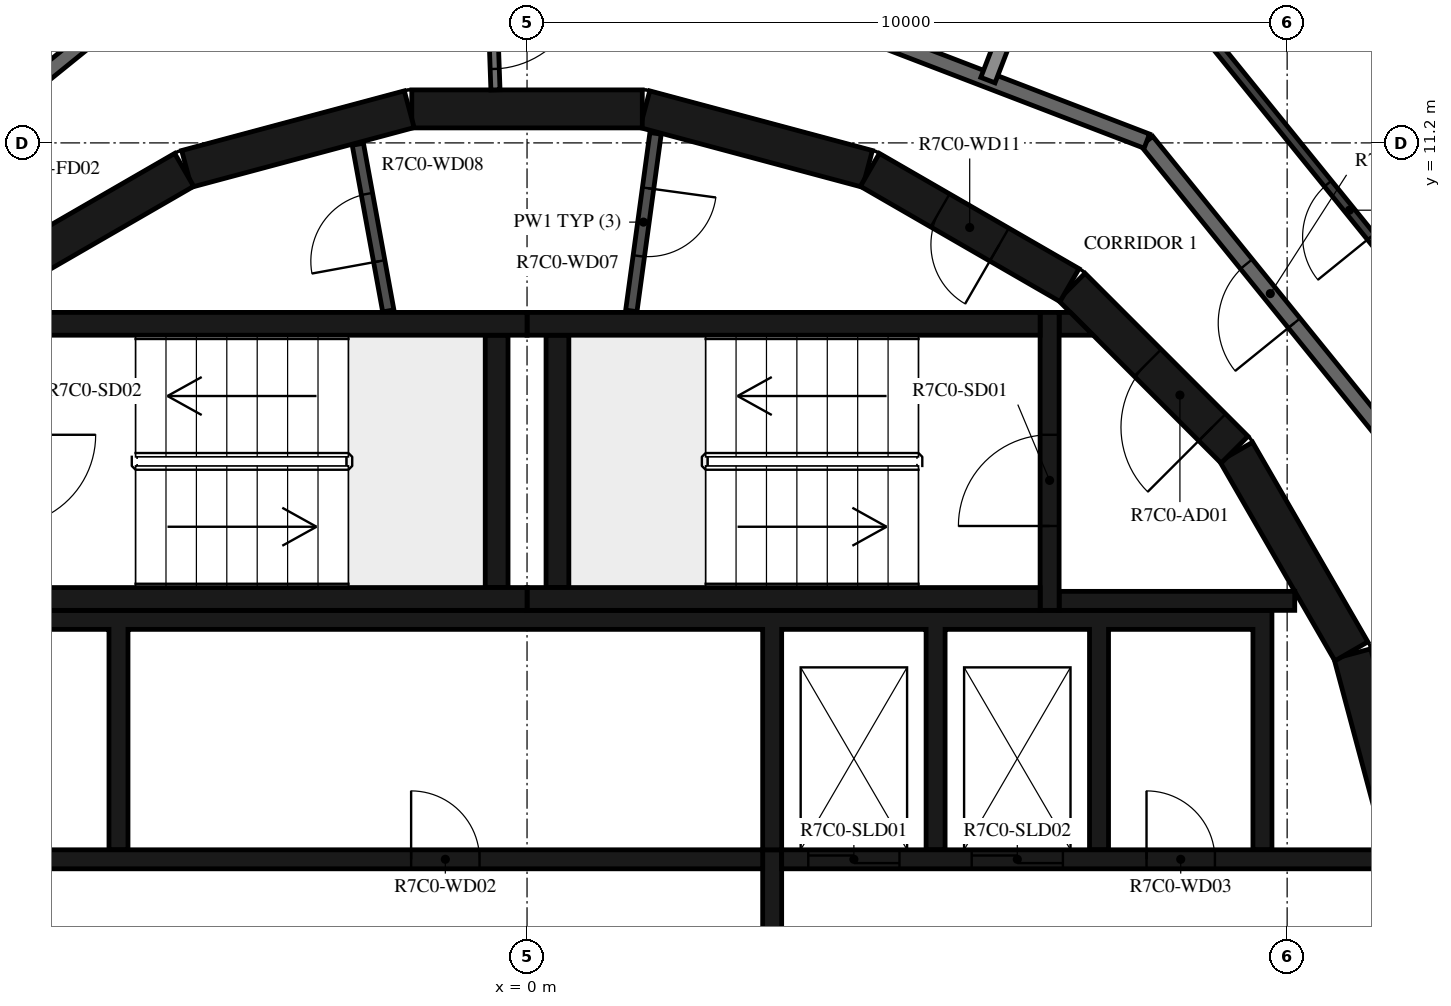
"""IFC4 building model, lengths in metres.
Left out: names, types, materials, properties, quantities, classifications, styles, units other than length and angle.
Written with IfcOpenShell. Run it as: python <this file> out.ifc"""

import sys

from ifc_helpers import new_model, si_unit, direction, frame, frame_2d, origin, place, context, subcontext, project, spatial, polyline, rectangle, outline, extrude, element, fill, save


model = new_model("IFC4")
c1 = context("Model", 3, precision=1e-05, world=origin(), true_north=direction((0.0, 1.0)))
c2 = subcontext(c1, "Body", "Model", "MODEL_VIEW")
j1 = project(units=[si_unit("LENGTHUNIT", "METRE"), si_unit("PLANEANGLEUNIT", "RADIAN")], contexts=[c1])
p1 = place(None, origin())
s1 = spatial("IfcSite", under=j1, at=p1, CompositionType="ELEMENT")
p2 = place(p1, origin())
s2 = spatial("IfcBuilding", under=s1, at=p2, CompositionType="ELEMENT")
p3 = place(p2, frame((0.0, 0.0, 284.4)))
s3 = spatial("IfcBuildingStorey", under=s2, at=p3, CompositionType="ELEMENT", Elevation=284.4)
for number, where, z_axis, x_axis in (
    (1, (11.643, 1.55, 0.0), (0.0, 0.0, 1.0), (-0.259, 0.966, 0.0)),
    (2, (10.845, 4.51, 0.0), (0.0, 0.0, 1.0), (-0.5, 0.866, 0.0)),
):
    element("IfcWall", number, at=place(p3, frame(where, z_axis=z_axis, x_axis=x_axis)), inside=s3, PredefinedType="SHEAR", context=c2, shape_type="SweptSolid", body=[
        extrude(rectangle(XDim=3.033, YDim=0.5, at=frame_2d((1.516, 0.0))), origin(), (0.0, 0.0, 1.0), 3.12),
    ])
p4 = place(p3, frame((9.308, 7.164, 0.0), z_axis=(0.0, 0.0, 1.0), x_axis=(-0.707106781187, 0.707106781187, 0.0)))
e3 = element("IfcWall", 3, at=p4, inside=s3, PredefinedType="SHEAR", context=c2, shape_type="SweptSolid", body=[
    extrude(rectangle(XDim=3.032, YDim=0.5, at=frame_2d((1.516, 0.0))), origin(), (0.0, 0.0, 1.0), 3.12),
])
p5 = place(p4, frame((0.416, 0.0, 0.0)))
e4 = element("IfcOpeningElement", 4, at=p5, cuts=e3, PredefinedType="OPENING", context=c2, shape_type="SweptSolid", body=[
    extrude(rectangle(XDim=1.2, YDim=2.1, at=frame_2d((0.6, 1.05))), frame((0.0, 0.26, 0.0), z_axis=(0.0, -1.0, 0.0), x_axis=(1.0, 0.0, 0.0)), (0.0, 0.0, 1.0), 0.52),
])
p6 = place(p3, frame((7.137, 9.329, 0.0), z_axis=(0.0, 0.0, 1.0), x_axis=(-0.865975092491, 0.500087131594, 0.0)))
e5 = element("IfcWall", 5, at=p6, inside=s3, PredefinedType="SHEAR", context=c2, shape_type="SweptSolid", body=[
    extrude(rectangle(XDim=3.033, YDim=0.5, at=frame_2d((1.516, 0.0))), origin(), (0.0, 0.0, 1.0), 3.12),
])
p7 = place(p6, frame((1.066, 0.0, 0.0)))
e6 = element("IfcOpeningElement", 6, at=p7, cuts=e5, PredefinedType="OPENING", context=c2, shape_type="SweptSolid", body=[
    extrude(rectangle(XDim=0.9, YDim=2.1, at=frame_2d((0.45, 1.05))), frame((0.0, 0.26, 0.0), z_axis=(0.0, -1.0, 0.0), x_axis=(1.0, 0.0, 0.0)), (0.0, 0.0, 1.0), 0.52),
])
for number, where, z_axis, x_axis in (
    (7, (4.479, 10.858, 0.0), (0.0, 0.0, 1.0), (-0.966, 0.259, 0.0)),
    (8, (1.516, 11.647, 0.0), (0.0, 0.0, 1.0), (-1.0, 0.0, 0.0)),
    (9, (-1.55, 11.643, 0.0), (0.0, 0.0, 1.0), (-0.966, -0.259, 0.0)),
    (10, (-4.51, 10.845, 0.0), (0.0, 0.0, 1.0), (-0.866, -0.5, 0.0)),
):
    element("IfcWall", number, at=place(p3, frame(where, z_axis=z_axis, x_axis=x_axis)), inside=s3, PredefinedType="SHEAR", context=c2, shape_type="SweptSolid", body=[
        extrude(rectangle(XDim=3.033, YDim=0.5, at=frame_2d((1.516, 0.0))), origin(), (0.0, 0.0, 1.0), 3.12),
    ])
for number, where, z_axis, x_axis in (
    (11, (0.0, 5.2, 0.0), (0.0, 0.0, 1.0), (1.0, 0.0, 0.0)),
    (12, (0.0, 8.82, 0.0), (0.0, 0.0, 1.0), (1.0, 0.0, 0.0)),
):
    element("IfcWall", number, at=place(p3, frame(where, z_axis=z_axis, x_axis=x_axis)), inside=s3, PredefinedType="SHEAR", context=c2, shape_type="SweptSolid", body=[
        extrude(rectangle(XDim=6.75, YDim=0.3, at=frame_2d((3.375, 0.0))), origin(), (0.0, 0.0, 1.0), 3.12),
    ])
p8 = place(p3, frame((0.4, 5.35, 0.0), z_axis=(0.0, 0.0, 1.0), x_axis=(0.0, 1.0, 0.0)))
e13 = element("IfcWall", 13, at=p8, inside=s3, PredefinedType="SHEAR", context=c2, shape_type="SweptSolid", body=[
    extrude(rectangle(XDim=3.32, YDim=0.3, at=frame_2d((1.66, 0.0))), origin(), (0.0, 0.0, 1.0), 3.12),
])
p9 = place(p3, frame((6.875, 5.05, 0.0), z_axis=(0.0, 0.0, 1.0), x_axis=(0.0, 1.0, 0.0)))
e14 = element("IfcWall", 14, at=p9, inside=s3, PredefinedType="SHEAR", context=c2, shape_type="SweptSolid", body=[
    extrude(rectangle(XDim=3.92, YDim=0.25, at=frame_2d((1.96, 0.0))), origin(), (0.0, 0.0, 1.0), 3.12),
])
p10 = place(p9, frame((1.11, 0.0, 0.0)))
e15 = element("IfcOpeningElement", 15, at=p10, cuts=e14, PredefinedType="OPENING", context=c2, shape_type="SweptSolid", body=[
    extrude(rectangle(XDim=1.2, YDim=2.1, at=frame_2d((0.6, 1.05))), frame((0.0, 0.135, 0.0), z_axis=(0.0, -1.0, 0.0), x_axis=(1.0, 0.0, 0.0)), (0.0, 0.0, 1.0), 0.27),
])
p11 = place(p3, frame((7.0, 5.175, 0.0), z_axis=(0.0, 0.0, 1.0), x_axis=(1.0, 0.0, 0.0)))
e16 = element("IfcWall", 16, at=p11, inside=s3, PredefinedType="SHEAR", context=c2, shape_type="SweptSolid", body=[
    extrude(rectangle(XDim=3.1, YDim=0.25, at=frame_2d((1.55, 0.0))), origin(), (0.0, 0.0, 1.0), 3.12),
])
p12 = place(p3, origin())
e17 = element("IfcWall", 17, at=p12, inside=s3, PredefinedType="SHEAR", context=c2, shape_type="SweptSolid", body=[
    extrude(outline(polyline([(7.448, 8.67), (7.0, 8.67), (7.0, 8.97), (7.148, 8.97), (7.448, 8.67)])), origin(), (0.0, 0.0, 1.0), 3.12),
])
for number, where, z_axis, x_axis in (
    (18, (-6.75, 5.2, 0.0), (0.0, 0.0, 1.0), (1.0, 0.0, 0.0)),
    (19, (-6.75, 8.82, 0.0), (0.0, 0.0, 1.0), (1.0, 0.0, 0.0)),
):
    element("IfcWall", number, at=place(p3, frame(where, z_axis=z_axis, x_axis=x_axis)), inside=s3, PredefinedType="SHEAR", context=c2, shape_type="SweptSolid", body=[
        extrude(rectangle(XDim=6.75, YDim=0.3, at=frame_2d((3.375, 0.0))), origin(), (0.0, 0.0, 1.0), 3.12),
    ])
p13 = place(p3, frame((-0.4, 5.35, 0.0), z_axis=(0.0, 0.0, 1.0), x_axis=(0.0, 1.0, 0.0)))
e20 = element("IfcWall", 20, at=p13, inside=s3, PredefinedType="SHEAR", context=c2, shape_type="SweptSolid", body=[
    extrude(rectangle(XDim=3.32, YDim=0.3, at=frame_2d((1.66, 0.0))), origin(), (0.0, 0.0, 1.0), 3.12),
])
p14 = place(p3, origin())
e21 = element("IfcWall", 21, at=p14, inside=s3, PredefinedType="SHEAR", context=c2, shape_type="SweptSolid", body=[
    extrude(outline(polyline([(-9.8, 1.9), (-9.55, 1.9), (-9.55, 4.8), (-5.5, 4.8), (-5.5, 1.9), (-5.25, 1.9), (-5.25, 4.8), (3.1, 4.8), (3.1, 1.9), (3.35, 1.9), (3.35, 4.8), (5.25, 4.8), (5.25, 1.9), (5.5, 1.9), (5.5, 4.8), (7.4, 4.8), (7.4, 1.9), (7.65, 1.9), (7.65, 4.8), (9.55, 4.8), (9.55, 1.9), (9.8, 1.9), (9.8, 4.8), (9.8, 5.05), (-9.8, 5.05), (-9.8, 4.8), (-9.8, 1.9)])), origin(), (0.0, 0.0, 1.0), 3.12),
])
p15 = place(p3, frame((-11.28, 1.775, 0.0), z_axis=(0.0, 0.0, 1.0), x_axis=(1.0, 0.0, 0.0)))
e22 = element("IfcWall", 22, at=p15, inside=s3, PredefinedType="SHEAR", context=c2, shape_type="SweptSolid", body=[
    extrude(rectangle(XDim=14.38, YDim=0.25, at=frame_2d((7.19, 0.0))), origin(), (0.0, 0.0, 1.0), 3.12),
])
p16 = place(p15, frame((3.305, 0.0, 0.0)))
e23 = element("IfcOpeningElement", 23, at=p16, cuts=e22, PredefinedType="OPENING", context=c2, shape_type="SweptSolid", body=[
    extrude(rectangle(XDim=0.9, YDim=2.1, at=frame_2d((0.45, 1.05))), frame((0.0, 0.135, 0.0), z_axis=(0.0, -1.0, 0.0), x_axis=(1.0, 0.0, 0.0)), (0.0, 0.0, 1.0), 0.27),
])
p17 = place(p15, frame((9.755, 0.0, 0.0)))
e24 = element("IfcOpeningElement", 24, at=p17, cuts=e22, PredefinedType="OPENING", context=c2, shape_type="SweptSolid", body=[
    extrude(rectangle(XDim=0.9, YDim=2.1, at=frame_2d((0.45, 1.05))), frame((0.0, 0.135, 0.0), z_axis=(0.0, -1.0, 0.0), x_axis=(1.0, 0.0, 0.0)), (0.0, 0.0, 1.0), 0.27),
])
p18 = place(p3, frame((3.35, 1.775, 0.0), z_axis=(0.0, 0.0, 1.0), x_axis=(1.0, 0.0, 0.0)))
e25 = element("IfcWall", 25, at=p18, inside=s3, PredefinedType="SHEAR", context=c2, shape_type="SweptSolid", body=[
    extrude(rectangle(XDim=7.93, YDim=0.25, at=frame_2d((3.965, 0.0))), origin(), (0.0, 0.0, 1.0), 3.12),
])
p19 = place(p18, frame((0.35, 0.0, 0.0)))
e26 = element("IfcOpeningElement", 26, at=p19, cuts=e25, PredefinedType="OPENING", context=c2, shape_type="SweptSolid", body=[
    extrude(rectangle(XDim=1.2, YDim=2.4, at=frame_2d((0.6, 1.2))), frame((0.0, 0.135, 0.0), z_axis=(0.0, -1.0, 0.0), x_axis=(1.0, 0.0, 0.0)), (0.0, 0.0, 1.0), 0.27),
])
p20 = place(p18, frame((2.5, 0.0, 0.0)))
e27 = element("IfcOpeningElement", 27, at=p20, cuts=e25, PredefinedType="OPENING", context=c2, shape_type="SweptSolid", body=[
    extrude(rectangle(XDim=1.2, YDim=2.4, at=frame_2d((0.6, 1.2))), frame((0.0, 0.135, 0.0), z_axis=(0.0, -1.0, 0.0), x_axis=(1.0, 0.0, 0.0)), (0.0, 0.0, 1.0), 0.27),
])
p21 = place(p18, frame((4.8, 0.0, 0.0)))
e28 = element("IfcOpeningElement", 28, at=p21, cuts=e25, PredefinedType="OPENING", context=c2, shape_type="SweptSolid", body=[
    extrude(rectangle(XDim=0.9, YDim=2.1, at=frame_2d((0.45, 1.05))), frame((0.0, 0.135, 0.0), z_axis=(0.0, -1.0, 0.0), x_axis=(1.0, 0.0, 0.0)), (0.0, 0.0, 1.0), 0.27),
])
p22 = place(p3, frame((3.225, -1.9, 0.0), z_axis=(0.0, 0.0, 1.0), x_axis=(0.0, 1.0, 0.0)))
e29 = element("IfcWall", 29, at=p22, inside=s3, PredefinedType="SHEAR", context=c2, shape_type="SweptSolid", body=[
    extrude(rectangle(XDim=3.8, YDim=0.25, at=frame_2d((1.9, 0.0))), origin(), (0.0, 0.0, 1.0), 3.12),
])
p23 = place(p3, frame((1.691, 11.326, 0.0), z_axis=(0.0, 0.0, 1.0), x_axis=(-0.135344253201, -0.990798633994, 0.0)))
e30 = element("IfcWall", 30, at=p23, inside=s3, PredefinedType="PARTITIONING", context=c2, shape_type="SweptSolid", body=[
    extrude(rectangle(XDim=2.358, YDim=0.15, at=frame_2d((1.179, 0.0))), origin(), (0.0, 0.0, 1.0), 3.12),
])
p24 = place(p23, frame((0.729, 0.0, 0.0)))
e31 = element("IfcOpeningElement", 31, at=p24, cuts=e30, PredefinedType="OPENING", context=c2, shape_type="SweptSolid", body=[
    extrude(rectangle(XDim=0.9, YDim=2.1, at=frame_2d((0.45, 1.05))), frame((0.0, 0.085, 0.0), z_axis=(0.0, -1.0, 0.0), x_axis=(1.0, 0.0, 0.0)), (0.0, 0.0, 1.0), 0.17),
])
p25 = place(p3, frame((-1.825, 8.99, 0.0), z_axis=(0.0, 0.0, 1.0), x_axis=(-0.179955206115, 0.983674805915, 0.0)))
e32 = element("IfcWall", 32, at=p25, inside=s3, PredefinedType="PARTITIONING", context=c2, shape_type="SweptSolid", body=[
    extrude(rectangle(XDim=2.229, YDim=0.15, at=frame_2d((1.115, 0.0))), origin(), (0.0, 0.0, 1.0), 3.12),
])
p26 = place(p25, frame((0.665, 0.0, 0.0)))
e33 = element("IfcOpeningElement", 33, at=p26, cuts=e32, PredefinedType="OPENING", context=c2, shape_type="SweptSolid", body=[
    extrude(rectangle(XDim=0.9, YDim=2.1, at=frame_2d((0.45, 1.05))), frame((0.0, 0.085, 0.0), z_axis=(0.0, -1.0, 0.0), x_axis=(1.0, 0.0, 0.0)), (0.0, 0.0, 1.0), 0.17),
])
p27 = place(p3, frame((-0.471, 13.492, 0.0), z_axis=(0.0, 0.0, 1.0), x_axis=(0.034873173869, -0.999391745886, 0.0)))
e34 = element("IfcWall", 34, at=p27, inside=s3, PredefinedType="PARTITIONING", context=c2, shape_type="SweptSolid", body=[
    extrude(rectangle(XDim=1.596, YDim=0.12, at=frame_2d((0.798, 0.0))), origin(), (0.0, 0.0, 1.0), 3.12),
])
p28 = place(p27, frame((0.12, 0.0, 0.0)))
e35 = element("IfcOpeningElement", 35, at=p28, cuts=e34, PredefinedType="OPENING", context=c2, shape_type="SweptSolid", body=[
    extrude(rectangle(XDim=1.2, YDim=2.1, at=frame_2d((0.6, 1.05))), frame((0.0, 0.07, 0.0), z_axis=(0.0, -1.0, 0.0), x_axis=(1.0, 0.0, 0.0)), (0.0, 0.0, 1.0), 0.14),
])
p29 = place(p3, frame((12.673, 5.643, 0.0), z_axis=(0.0, 0.0, 1.0), x_axis=(-0.629302871585, 0.777160148113, 0.0)))
e36 = element("IfcWall", 36, at=p29, inside=s3, PredefinedType="STANDARD", context=c2, shape_type="SweptSolid", body=[
    extrude(rectangle(XDim=7.181, YDim=0.2, at=frame_2d((3.59, 0.0))), origin(), (0.0, 0.0, 1.0), 3.12),
])
p30 = place(p29, frame((4.1, 0.0, 0.0)))
e37 = element("IfcOpeningElement", 37, at=p30, cuts=e36, PredefinedType="OPENING", context=c2, shape_type="SweptSolid", body=[
    extrude(rectangle(XDim=1.0, YDim=2.1, at=frame_2d((0.5, 1.05))), frame((0.0, 0.11, 0.0), z_axis=(0.0, -1.0, 0.0), x_axis=(1.0, 0.0, 0.0)), (0.0, 0.0, 1.0), 0.22),
])
p31 = place(p3, frame((8.154, 11.223, 0.0), z_axis=(0.0, 0.0, 1.0), x_axis=(-0.93359073609, 0.358341090983, 0.0)))
e38 = element("IfcWall", 38, at=p31, inside=s3, PredefinedType="STANDARD", context=c2, shape_type="SweptSolid", body=[
    extrude(rectangle(XDim=7.181, YDim=0.2, at=frame_2d((3.59, 0.0))), origin(), (0.0, 0.0, 1.0), 3.12),
])
p32 = place(p3, frame((-5.643, 12.673, 0.0), z_axis=(0.0, 0.0, 1.0), x_axis=(-0.777160148113, -0.629302871585, 0.0)))
e39 = element("IfcWall", 39, at=p32, inside=s3, PredefinedType="STANDARD", context=c2, shape_type="SweptSolid", body=[
    extrude(rectangle(XDim=7.181, YDim=0.2, at=frame_2d((3.59, 0.0))), origin(), (0.0, 0.0, 1.0), 3.12),
])
p33 = place(p32, frame((2.39, 0.0, 0.0)))
e40 = element("IfcOpeningElement", 40, at=p33, cuts=e39, PredefinedType="OPENING", context=c2, shape_type="SweptSolid", body=[
    extrude(rectangle(XDim=1.0, YDim=2.1, at=frame_2d((0.5, 1.05))), frame((0.0, 0.11, 0.0), z_axis=(0.0, -1.0, 0.0), x_axis=(1.0, 0.0, 0.0)), (0.0, 0.0, 1.0), 0.22),
])
p34 = place(p32, frame((5.19, 0.0, 0.0)))
e41 = element("IfcOpeningElement", 41, at=p34, cuts=e39, PredefinedType="OPENING", context=c2, shape_type="SweptSolid", body=[
    extrude(rectangle(XDim=1.0, YDim=2.1, at=frame_2d((0.5, 1.05))), frame((0.0, 0.11, 0.0), z_axis=(0.0, -1.0, 0.0), x_axis=(1.0, 0.0, 0.0)), (0.0, 0.0, 1.0), 0.22),
])
p35 = place(p3, frame((7.532, 15.85, 0.0), z_axis=(0.0, 0.0, 1.0), x_axis=(-0.358355996975, -0.933585014571, 0.0)))
e42 = element("IfcWall", 42, at=p35, inside=s3, PredefinedType="STANDARD", context=c2, shape_type="SweptSolid", body=[
    extrude(rectangle(XDim=4.096, YDim=0.2, at=frame_2d((2.048, 0.0))), origin(), (0.0, 0.0, 1.0), 2.73),
])
p36 = place(p3, frame((14.092, 6.274, 0.0), z_axis=(0.0, 0.0, 1.0), x_axis=(-0.62933367237, 0.777135206268, 0.0)))
e43 = element("IfcWall", 43, at=p36, inside=s3, PredefinedType="PARTITIONING", context=c2, shape_type="SweptSolid", body=[
    extrude(rectangle(XDim=7.985, YDim=0.12, at=frame_2d((3.992, 0.0))), origin(), (0.0, 0.0, 1.0), 3.12),
])
p37 = place(p36, frame((2.978, 0.0, 0.0)))
e44 = element("IfcOpeningElement", 44, at=p37, cuts=e43, PredefinedType="OPENING", context=c2, shape_type="SweptSolid", body=[
    extrude(rectangle(XDim=0.9, YDim=2.1, at=frame_2d((0.45, 1.05))), frame((0.0, 0.07, 0.0), z_axis=(0.0, -1.0, 0.0), x_axis=(1.0, 0.0, 0.0)), (0.0, 0.0, 1.0), 0.14),
])
p38 = place(p36, frame((4.749, 0.0, 0.0)))
e45 = element("IfcOpeningElement", 45, at=p38, cuts=e43, PredefinedType="OPENING", context=c2, shape_type="SweptSolid", body=[
    extrude(rectangle(XDim=0.9, YDim=2.1, at=frame_2d((0.45, 1.05))), frame((0.0, 0.07, 0.0), z_axis=(0.0, -1.0, 0.0), x_axis=(1.0, 0.0, 0.0)), (0.0, 0.0, 1.0), 0.14),
])
p39 = place(p10, origin())
e46 = element("IfcDoor", 46, at=p39, inside=s3, OperationType="SINGLE_SWING_LEFT", PredefinedType="DOOR", context=c2, shape_type="SweptSolid", body=[
    extrude(rectangle(XDim=1.2, YDim=2.1, at=frame_2d((0.6, 1.05))), frame((0.0, 0.025, 0.0), z_axis=(0.0, -1.0, 0.0), x_axis=(1.0, 0.0, 0.0)), (0.0, 0.0, 1.0), 0.05),
])
fill(e15, e46)
p40 = place(p5, origin())
e47 = element("IfcDoor", 47, at=p40, inside=s3, OperationType="SINGLE_SWING_RIGHT", PredefinedType="DOOR", context=c2, shape_type="SweptSolid", body=[
    extrude(rectangle(XDim=1.2, YDim=2.1, at=frame_2d((0.6, 1.05))), frame((0.0, 0.025, 0.0), z_axis=(0.0, -1.0, 0.0), x_axis=(1.0, 0.0, 0.0)), (0.0, 0.0, 1.0), 0.05),
])
fill(e4, e47)
p41 = place(p19, origin())
e48 = element("IfcDoor", 48, at=p41, inside=s3, OperationType="DOUBLE_DOOR_SLIDING", PredefinedType="DOOR", context=c2, shape_type="SweptSolid", body=[
    extrude(rectangle(XDim=1.2, YDim=2.4, at=frame_2d((0.6, 1.2))), frame((0.0, 0.025, 0.0), z_axis=(0.0, -1.0, 0.0), x_axis=(1.0, 0.0, 0.0)), (0.0, 0.0, 1.0), 0.05),
])
fill(e26, e48)
p42 = place(p20, origin())
e49 = element("IfcDoor", 49, at=p42, inside=s3, OperationType="DOUBLE_DOOR_SLIDING", PredefinedType="DOOR", context=c2, shape_type="SweptSolid", body=[
    extrude(rectangle(XDim=1.2, YDim=2.4, at=frame_2d((0.6, 1.2))), frame((0.0, 0.025, 0.0), z_axis=(0.0, -1.0, 0.0), x_axis=(1.0, 0.0, 0.0)), (0.0, 0.0, 1.0), 0.05),
])
fill(e27, e49)
p43 = place(p17, origin())
e50 = element("IfcDoor", 50, at=p43, inside=s3, OperationType="SINGLE_SWING_RIGHT", PredefinedType="DOOR", context=c2, shape_type="SweptSolid", body=[
    extrude(rectangle(XDim=0.9, YDim=2.1, at=frame_2d((0.45, 1.05))), frame((0.0, 0.025, 0.0), z_axis=(0.0, -1.0, 0.0), x_axis=(1.0, 0.0, 0.0)), (0.0, 0.0, 1.0), 0.05),
])
fill(e24, e50)
p44 = place(p21, origin())
e51 = element("IfcDoor", 51, at=p44, inside=s3, OperationType="SINGLE_SWING_LEFT", PredefinedType="DOOR", context=c2, shape_type="SweptSolid", body=[
    extrude(rectangle(XDim=0.9, YDim=2.1, at=frame_2d((0.45, 1.05))), frame((0.0, 0.025, 0.0), z_axis=(0.0, -1.0, 0.0), x_axis=(1.0, 0.0, 0.0)), (0.0, 0.0, 1.0), 0.05),
])
fill(e28, e51)
p45 = place(p24, origin())
e52 = element("IfcDoor", 52, at=p45, inside=s3, OperationType="SINGLE_SWING_LEFT", PredefinedType="DOOR", context=c2, shape_type="SweptSolid", body=[
    extrude(rectangle(XDim=0.9, YDim=2.1, at=frame_2d((0.45, 1.05))), frame((0.0, 0.025, 0.0), z_axis=(0.0, -1.0, 0.0), x_axis=(1.0, 0.0, 0.0)), (0.0, 0.0, 1.0), 0.05),
])
fill(e31, e52)
p46 = place(p26, origin())
e53 = element("IfcDoor", 53, at=p46, inside=s3, OperationType="SINGLE_SWING_RIGHT", PredefinedType="DOOR", context=c2, shape_type="SweptSolid", body=[
    extrude(rectangle(XDim=0.9, YDim=2.1, at=frame_2d((0.45, 1.05))), frame((0.0, 0.025, 0.0), z_axis=(0.0, -1.0, 0.0), x_axis=(1.0, 0.0, 0.0)), (0.0, 0.0, 1.0), 0.05),
])
fill(e33, e53)
p47 = place(p7, origin())
e54 = element("IfcDoor", 54, at=p47, inside=s3, OperationType="SINGLE_SWING_LEFT", PredefinedType="DOOR", context=c2, shape_type="SweptSolid", body=[
    extrude(rectangle(XDim=0.9, YDim=2.1, at=frame_2d((0.45, 1.05))), frame((0.0, 0.025, 0.0), z_axis=(0.0, -1.0, 0.0), x_axis=(1.0, 0.0, 0.0)), (0.0, 0.0, 1.0), 0.05),
])
fill(e6, e54)
p48 = place(p30, origin())
e55 = element("IfcDoor", 55, at=p48, inside=s3, OperationType="SINGLE_SWING_LEFT", PredefinedType="DOOR", context=c2, shape_type="SweptSolid", body=[
    extrude(rectangle(XDim=1.0, YDim=2.1, at=frame_2d((0.5, 1.05))), frame((0.0, 0.025, 0.0), z_axis=(0.0, -1.0, 0.0), x_axis=(1.0, 0.0, 0.0)), (0.0, 0.0, 1.0), 0.05),
])
fill(e37, e55)
p49 = place(p38, origin())
e56 = element("IfcDoor", 56, at=p49, inside=s3, OperationType="SINGLE_SWING_LEFT", PredefinedType="DOOR", context=c2, shape_type="SweptSolid", body=[
    extrude(rectangle(XDim=0.9, YDim=2.1, at=frame_2d((0.45, 1.05))), frame((0.0, 0.025, 0.0), z_axis=(0.0, -1.0, 0.0), x_axis=(1.0, 0.0, 0.0)), (0.0, 0.0, 1.0), 0.05),
])
fill(e45, e56)
p50 = place(p28, origin())
e57 = element("IfcDoor", 57, at=p50, inside=s3, OperationType="DOUBLE_DOOR_SINGLE_SWING", PredefinedType="DOOR", context=c2, shape_type="SweptSolid", body=[
    extrude(rectangle(XDim=1.2, YDim=2.1, at=frame_2d((0.6, 1.05))), frame((0.0, 0.025, 0.0), z_axis=(0.0, -1.0, 0.0), x_axis=(1.0, 0.0, 0.0)), (0.0, 0.0, 1.0), 0.05),
])
fill(e35, e57)
save(model, sys.argv[1])
